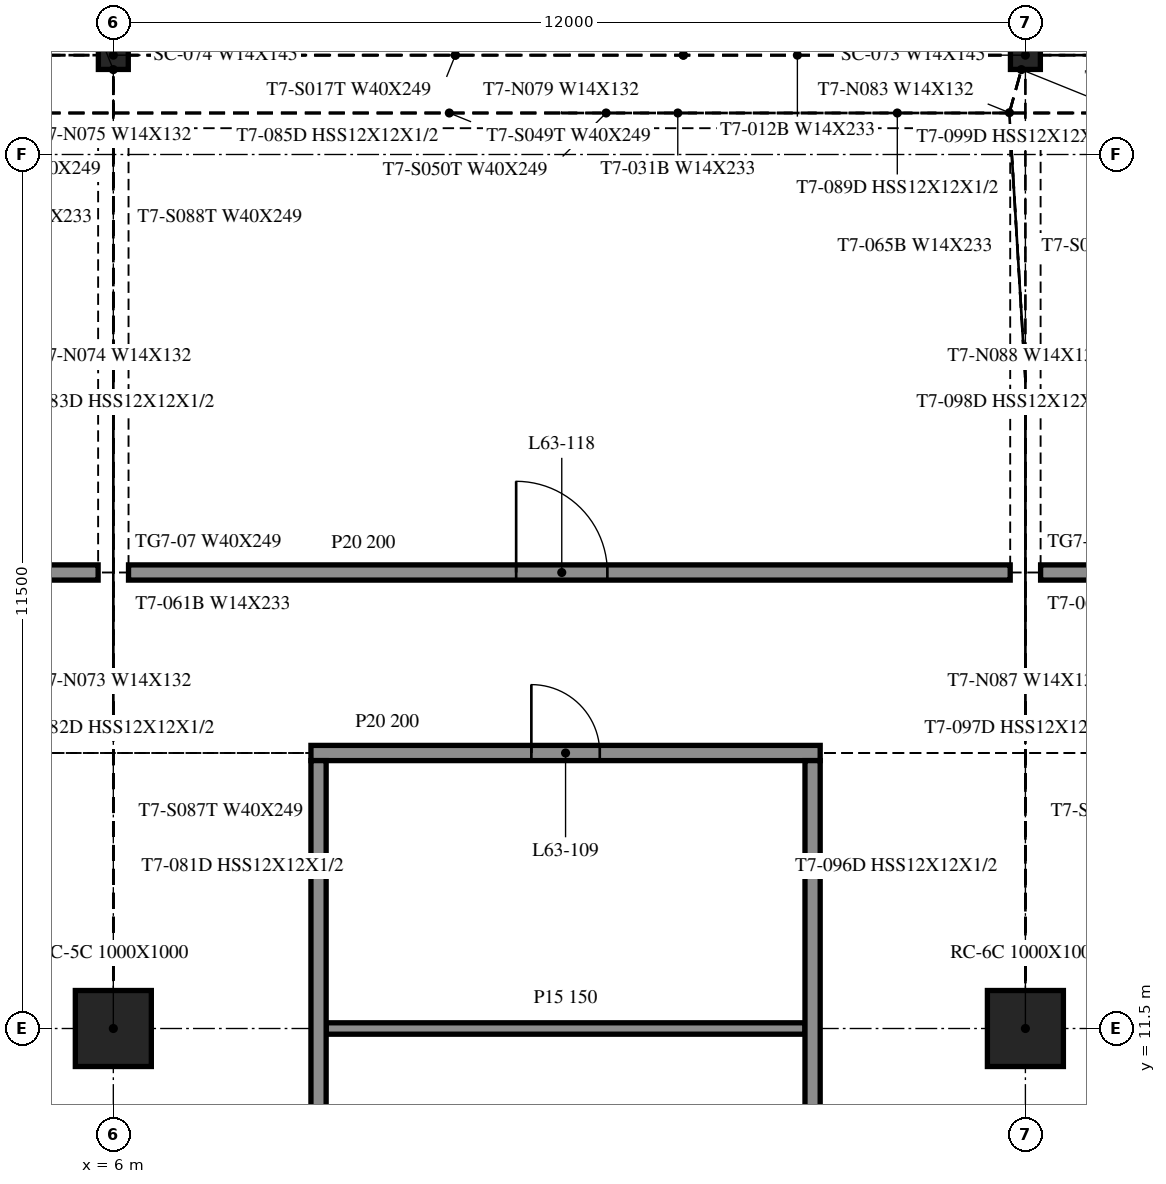
"""IFC4 building model, lengths in metres.
Left out: names, types, materials, properties, quantities, classifications, styles, units other than length and angle.
Written with IfcOpenShell. Run it as: python <this file> out.ifc"""

import sys

from ifc_helpers import new_model, si_unit, direction, frame, frame_2d, origin, origin_2d, place, context, subcontext, project, spatial, rectangle, i_section, extrude, element, fill, save


model = new_model("IFC4")
c1 = context("Model", 3, precision=1e-05, world=origin(), true_north=direction((0.0, 1.0)))
c2 = subcontext(c1, "Body", "Model", "MODEL_VIEW")
j1 = project(units=[si_unit("LENGTHUNIT", "METRE"), si_unit("PLANEANGLEUNIT", "RADIAN")], contexts=[c1])
p1 = place(None, origin())
s1 = spatial("IfcSite", under=j1, at=p1, CompositionType="ELEMENT")
p2 = place(p1, origin())
s2 = spatial("IfcBuilding", under=s1, at=p2, CompositionType="ELEMENT")
p3 = place(p2, frame((0.0, 0.0, 259.0)))
s3 = spatial("IfcBuildingStorey", under=s2, at=p3, CompositionType="ELEMENT", Elevation=259.0)
for number, where, z_axis, x_axis in (
    (1, (6.0, 11.5, -0.4), (0.0, 0.0, 1.0), (1.0, 0.0, 0.0)),
    (2, (18.0, 11.5, -0.4), (0.0, 0.0, 1.0), (1.0, 0.0, 0.0)),
):
    element("IfcColumn", number, at=place(p3, frame(where, z_axis=z_axis, x_axis=x_axis)), inside=s3, PredefinedType="COLUMN", context=c2, shape_type="SweptSolid", body=[
        extrude(rectangle(XDim=1.0, YDim=1.0, at=origin_2d()), origin(), (0.0, 0.0, 1.0), 4.36),
    ])
for number, where, z_axis, x_axis in (
    (3, (18.0, 24.307, -0.4), (0.0, 0.0, 1.0), (1.0, 0.0, 0.0)),
    (4, (6.0, 24.307, -0.4), (0.0, 0.0, 1.0), (1.0, 0.0, 0.0)),
):
    element("IfcColumn", number, at=place(p3, frame(where, z_axis=z_axis, x_axis=x_axis)), inside=s3, PredefinedType="COLUMN", context=c2, shape_type="SweptSolid", body=[
        extrude(i_section(OverallWidth=0.394, OverallDepth=0.376, WebThickness=0.017, FlangeThickness=0.028, at=origin_2d()), origin(), (0.0, 0.0, 1.0), 4.36),
    ])
p4 = place(p3, frame((8.8, 11.5, 0.0), z_axis=(0.0, 0.0, 1.0), x_axis=(1.0, 0.0, 0.0)))
e5 = element("IfcWall", 5, at=p4, inside=s3, PredefinedType="PARTITIONING", context=c2, shape_type="SweptSolid", body=[
    extrude(rectangle(XDim=6.3, YDim=0.15, at=frame_2d((3.15, 0.0))), origin(), (0.0, 0.0, 1.0), 3.96),
])
p5 = place(p3, frame((8.6, 15.125, 0.0), z_axis=(0.0, 0.0, 1.0), x_axis=(1.0, 0.0, 0.0)))
e6 = element("IfcWall", 6, at=p5, inside=s3, PredefinedType="PARTITIONING", context=c2, shape_type="SweptSolid", body=[
    extrude(rectangle(XDim=6.7, YDim=0.2, at=frame_2d((3.35, 0.0))), origin(), (0.0, 0.0, 1.0), 3.96),
])
p6 = place(p5, frame((2.9, 0.0, 0.0)))
e7 = element("IfcOpeningElement", 7, at=p6, cuts=e6, PredefinedType="OPENING", context=c2, shape_type="SweptSolid", body=[
    extrude(rectangle(XDim=0.9, YDim=2.1, at=frame_2d((0.45, 1.05))), frame((0.0, 0.11, 0.0), z_axis=(0.0, -1.0, 0.0), x_axis=(1.0, 0.0, 0.0)), (0.0, 0.0, 1.0), 0.22),
])
p7 = place(p3, frame((-5.8, 17.5, 0.0), z_axis=(0.0, 0.0, 1.0), x_axis=(1.0, 0.0, 0.0)))
e8 = element("IfcWall", 8, at=p7, inside=s3, PredefinedType="PARTITIONING", context=c2, shape_type="SweptSolid", body=[
    extrude(rectangle(XDim=11.6, YDim=0.2, at=frame_2d((5.8, 0.0))), origin(), (0.0, 0.0, 1.0), 3.96),
])
p8 = place(p7, frame((5.1, 0.0, 0.0)))
e9 = element("IfcOpeningElement", 9, at=p8, cuts=e8, PredefinedType="OPENING", context=c2, shape_type="SweptSolid", body=[
    extrude(rectangle(XDim=1.2, YDim=2.1, at=frame_2d((0.6, 1.05))), frame((0.0, 0.11, 0.0), z_axis=(0.0, -1.0, 0.0), x_axis=(1.0, 0.0, 0.0)), (0.0, 0.0, 1.0), 0.22),
])
p9 = place(p3, frame((6.2, 17.5, 0.0), z_axis=(0.0, 0.0, 1.0), x_axis=(1.0, 0.0, 0.0)))
e10 = element("IfcWall", 10, at=p9, inside=s3, PredefinedType="PARTITIONING", context=c2, shape_type="SweptSolid", body=[
    extrude(rectangle(XDim=11.6, YDim=0.2, at=frame_2d((5.8, 0.0))), origin(), (0.0, 0.0, 1.0), 3.96),
])
p10 = place(p9, frame((5.1, 0.0, 0.0)))
e11 = element("IfcOpeningElement", 11, at=p10, cuts=e10, PredefinedType="OPENING", context=c2, shape_type="SweptSolid", body=[
    extrude(rectangle(XDim=1.2, YDim=2.1, at=frame_2d((0.6, 1.05))), frame((0.0, 0.11, 0.0), z_axis=(0.0, -1.0, 0.0), x_axis=(1.0, 0.0, 0.0)), (0.0, 0.0, 1.0), 0.22),
])
p11 = place(p3, frame((18.2, 17.5, 0.0), z_axis=(0.0, 0.0, 1.0), x_axis=(1.0, 0.0, 0.0)))
e12 = element("IfcWall", 12, at=p11, inside=s3, PredefinedType="PARTITIONING", context=c2, shape_type="SweptSolid", body=[
    extrude(rectangle(XDim=11.6, YDim=0.2, at=frame_2d((5.8, 0.0))), origin(), (0.0, 0.0, 1.0), 3.96),
])
p12 = place(p11, frame((5.1, 0.0, 0.0)))
e13 = element("IfcOpeningElement", 13, at=p12, cuts=e12, PredefinedType="OPENING", context=c2, shape_type="SweptSolid", body=[
    extrude(rectangle(XDim=1.2, YDim=2.1, at=frame_2d((0.6, 1.05))), frame((0.0, 0.11, 0.0), z_axis=(0.0, -1.0, 0.0), x_axis=(1.0, 0.0, 0.0)), (0.0, 0.0, 1.0), 0.22),
])
p13 = place(p3, frame((8.7, -9.025, 0.0), z_axis=(0.0, 0.0, 1.0), x_axis=(0.0, 1.0, 0.0)))
e14 = element("IfcWall", 14, at=p13, inside=s3, PredefinedType="PARTITIONING", context=c2, shape_type="SweptSolid", body=[
    extrude(rectangle(XDim=24.05, YDim=0.2, at=frame_2d((12.025, 0.0))), origin(), (0.0, 0.0, 1.0), 3.96),
])
p14 = place(p13, frame((11.5, 0.0, 0.0)))
e15 = element("IfcOpeningElement", 15, at=p14, cuts=e14, PredefinedType="OPENING", context=c2, shape_type="SweptSolid", body=[
    extrude(rectangle(XDim=1.0, YDim=2.1, at=frame_2d((0.5, 1.05))), frame((0.0, 0.11, 0.0), z_axis=(0.0, -1.0, 0.0), x_axis=(1.0, 0.0, 0.0)), (0.0, 0.0, 1.0), 0.22),
])
p15 = place(p3, frame((15.2, -9.025, 0.0), z_axis=(0.0, 0.0, 1.0), x_axis=(0.0, 1.0, 0.0)))
e16 = element("IfcWall", 16, at=p15, inside=s3, PredefinedType="PARTITIONING", context=c2, shape_type="SweptSolid", body=[
    extrude(rectangle(XDim=24.05, YDim=0.2, at=frame_2d((12.025, 0.0))), origin(), (0.0, 0.0, 1.0), 3.96),
])
p16 = place(p6, origin())
e17 = element("IfcDoor", 17, at=p16, inside=s3, OperationType="SINGLE_SWING_RIGHT", PredefinedType="DOOR", context=c2, shape_type="SweptSolid", body=[
    extrude(rectangle(XDim=0.9, YDim=2.1, at=frame_2d((0.45, 1.05))), frame((0.0, 0.025, 0.0), z_axis=(0.0, -1.0, 0.0), x_axis=(1.0, 0.0, 0.0)), (0.0, 0.0, 1.0), 0.05),
])
fill(e7, e17)
p17 = place(p10, origin())
e18 = element("IfcDoor", 18, at=p17, inside=s3, OperationType="SINGLE_SWING_LEFT", PredefinedType="DOOR", context=c2, shape_type="SweptSolid", body=[
    extrude(rectangle(XDim=1.2, YDim=2.1, at=frame_2d((0.6, 1.05))), frame((0.0, 0.025, 0.0), z_axis=(0.0, -1.0, 0.0), x_axis=(1.0, 0.0, 0.0)), (0.0, 0.0, 1.0), 0.05),
])
fill(e11, e18)
save(model, sys.argv[1])
